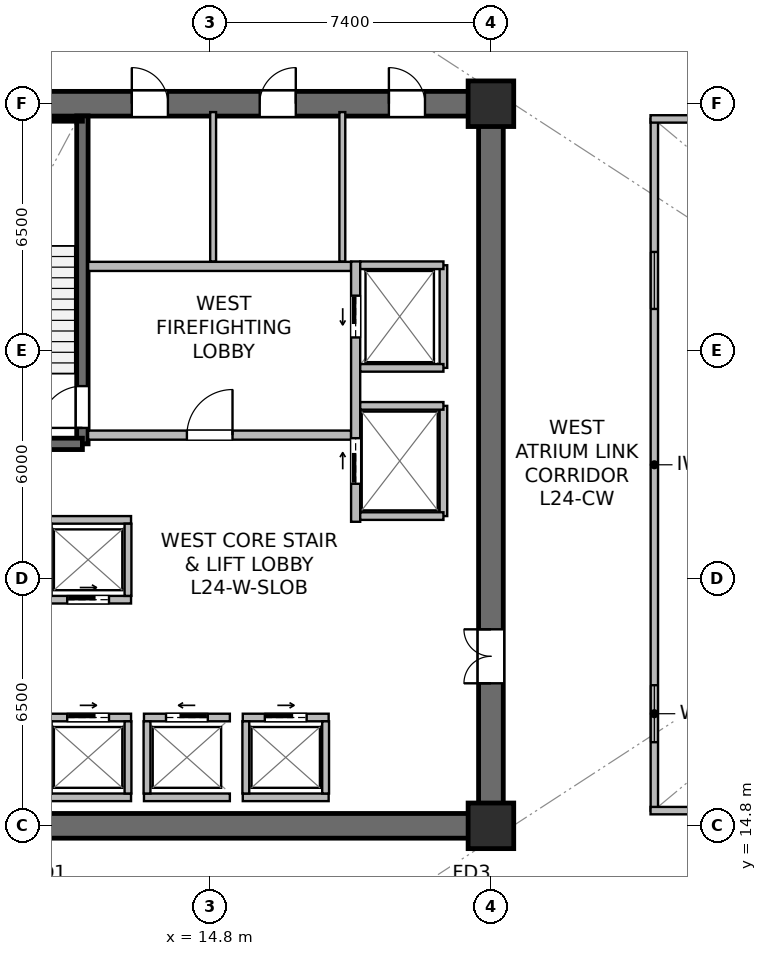
"""IFC4 building model, lengths in metres.
Left out: names, types, materials, properties, quantities, classifications, styles, units other than length and angle.
Written with IfcOpenShell. Run it as: python <this file> out.ifc"""

import sys

from ifc_helpers import new_model, si_unit, direction, frame, frame_2d, origin, origin_2d, place, context, subcontext, project, spatial, rectangle, extrude, source, transform, mapped, element, fill, save


model = new_model("IFC4")
c1 = context("Model", 3, precision=1e-05, world=origin(), true_north=direction((0.0, 1.0)))
c2 = subcontext(c1, "Body", "Model", "MODEL_VIEW")
j1 = project(units=[si_unit("LENGTHUNIT", "METRE"), si_unit("PLANEANGLEUNIT", "RADIAN")], contexts=[c1])
p1 = place(None, origin())
s1 = spatial("IfcSite", under=j1, at=p1, CompositionType="ELEMENT")
p2 = place(p1, origin())
s2 = spatial("IfcBuilding", under=s1, at=p2, CompositionType="ELEMENT")
p3 = place(p2, frame((0.0, 0.0, 100.3)))
s3 = spatial("IfcBuildingStorey", under=s2, at=p3, CompositionType="ELEMENT", Elevation=100.3)
p4 = place(p3, frame((7.075, 14.8, 0.0), z_axis=(0.0, 0.0, 1.0), x_axis=(1.0, 0.0, 0.0)))
e1 = element("IfcWall", 1, at=p4, inside=s3, PredefinedType="SHEAR", context=c2, shape_type="SweptSolid", body=[
    extrude(rectangle(XDim=15.45, YDim=0.65, at=frame_2d((7.725, 0.0))), origin(), (0.0, 0.0, 1.0), 4.49),
])
p5 = place(p3, frame((7.075, 33.8, 0.0), z_axis=(0.0, 0.0, 1.0), x_axis=(1.0, 0.0, 0.0)))
e2 = element("IfcWall", 2, at=p5, inside=s3, PredefinedType="SHEAR", context=c2, shape_type="SweptSolid", body=[
    extrude(rectangle(XDim=15.45, YDim=0.65, at=frame_2d((7.725, 0.0))), origin(), (0.0, 0.0, 1.0), 4.49),
])
p6 = place(p5, frame((5.675, 0.0, 0.0)))
e3 = element("IfcOpeningElement", 3, at=p6, cuts=e2, PredefinedType="OPENING", context=c2, shape_type="SweptSolid", body=[
    extrude(rectangle(XDim=0.95, YDim=2.15, at=frame_2d((0.475, 1.075))), frame((0.0, 0.335, 0.0), z_axis=(0.0, -1.0, 0.0), x_axis=(1.0, 0.0, 0.0)), (0.0, 0.0, 1.0), 0.67),
])
p7 = place(p5, frame((9.04, 0.0, 0.0)))
e4 = element("IfcOpeningElement", 4, at=p7, cuts=e2, PredefinedType="OPENING", context=c2, shape_type="SweptSolid", body=[
    extrude(rectangle(XDim=0.95, YDim=2.15, at=frame_2d((0.475, 1.075))), frame((0.0, 0.335, 0.0), z_axis=(0.0, -1.0, 0.0), x_axis=(1.0, 0.0, 0.0)), (0.0, 0.0, 1.0), 0.67),
])
p8 = place(p5, frame((12.44, 0.0, 0.0)))
e5 = element("IfcOpeningElement", 5, at=p8, cuts=e2, PredefinedType="OPENING", context=c2, shape_type="SweptSolid", body=[
    extrude(rectangle(XDim=0.95, YDim=2.15, at=frame_2d((0.475, 1.075))), frame((0.0, 0.335, 0.0), z_axis=(0.0, -1.0, 0.0), x_axis=(1.0, 0.0, 0.0)), (0.0, 0.0, 1.0), 0.67),
])
p9 = place(p3, frame((22.2, 15.125, 0.0), z_axis=(0.0, 0.0, 1.0), x_axis=(0.0, 1.0, 0.0)))
e6 = element("IfcWall", 6, at=p9, inside=s3, PredefinedType="SHEAR", context=c2, shape_type="SweptSolid", body=[
    extrude(rectangle(XDim=18.35, YDim=0.65, at=frame_2d((9.175, 0.0))), origin(), (0.0, 0.0, 1.0), 4.49),
])
p10 = place(p9, frame((3.425, 0.0, 0.0)))
e7 = element("IfcOpeningElement", 7, at=p10, cuts=e6, PredefinedType="OPENING", context=c2, shape_type="SweptSolid", body=[
    extrude(rectangle(XDim=1.42, YDim=2.2, at=frame_2d((0.71, 1.1))), frame((0.0, 0.335, 0.0), z_axis=(0.0, -1.0, 0.0), x_axis=(1.0, 0.0, 0.0)), (0.0, 0.0, 1.0), 0.67),
])
p11 = place(p3, frame((11.45, 24.85, 0.0), z_axis=(0.0, 0.0, 1.0), x_axis=(0.0, 1.0, 0.0)))
e8 = element("IfcWall", 8, at=p11, inside=s3, PredefinedType="SHEAR", context=c2, shape_type="SweptSolid", body=[
    extrude(rectangle(XDim=8.63, YDim=0.3, at=frame_2d((4.315, 0.0))), origin(), (0.0, 0.0, 1.0), 4.49),
])
p12 = place(p11, frame((0.42, 0.0, 0.0)))
e9 = element("IfcOpeningElement", 9, at=p12, cuts=e8, PredefinedType="OPENING", context=c2, shape_type="SweptSolid", body=[
    extrude(rectangle(XDim=1.1, YDim=2.15, at=frame_2d((0.55, 1.075))), frame((0.0, 0.16, 0.0), z_axis=(0.0, -1.0, 0.0), x_axis=(1.0, 0.0, 0.0)), (0.0, 0.0, 1.0), 0.32),
])
p13 = place(p3, frame((7.65, 24.85, 0.0), z_axis=(0.0, 0.0, 1.0), x_axis=(1.0, 0.0, 0.0)))
e10 = element("IfcWall", 10, at=p13, inside=s3, PredefinedType="SHEAR", context=c2, shape_type="SweptSolid", body=[
    extrude(rectangle(XDim=3.8, YDim=0.3, at=frame_2d((1.9, 0.0))), origin(), (0.0, 0.0, 1.0), 4.49),
])
p14 = place(p3, frame((7.73, 33.4, 0.0), z_axis=(0.0, 0.0, 1.0), x_axis=(1.0, 0.0, 0.0)))
e11 = element("IfcWall", 11, at=p14, inside=s3, PredefinedType="SOLIDWALL", context=c2, shape_type="SweptSolid", body=[
    extrude(rectangle(XDim=3.72, YDim=0.12, at=frame_2d((1.86, 0.0))), origin(), (0.0, 0.0, 1.0), 4.49),
])
m1 = source(origin(), c2, "Body", "SweptSolid", [
    extrude(rectangle(XDim=1.2, YDim=1.2, at=origin_2d()), origin(), (0.0, 0.0, 1.0), 4.8),
])
for number, where, z_axis, x_axis in (
    (12, (22.2, 14.8, 0.0), (0.0, 0.0, 1.0), (1.0, 0.0, 0.0)),
    (13, (22.2, 33.8, 0.0), (0.0, 0.0, 1.0), (1.0, 0.0, 0.0)),
):
    element("IfcColumn", number, at=place(p3, frame(where, z_axis=z_axis, x_axis=x_axis)), inside=s3, PredefinedType="COLUMN", context=c2, shape_type="MappedRepresentation", body=[
        mapped(m1, transform((0.0, 0.0, 0.0), scale=1.0)),
    ])
p15 = place(p3, frame((11.6, 25.08, 0.0), z_axis=(0.0, 0.0, 1.0), x_axis=(1.0, 0.0, 0.0)))
e14 = element("IfcWall", 14, at=p15, inside=s3, PredefinedType="SOLIDWALL", context=c2, shape_type="SweptSolid", body=[
    extrude(rectangle(XDim=6.92, YDim=0.24, at=frame_2d((3.46, 0.0))), origin(), (0.0, 0.0, 1.0), 3.825),
])
p16 = place(p15, frame((2.6, 0.0, 0.0)))
e15 = element("IfcOpeningElement", 15, at=p16, cuts=e14, PredefinedType="OPENING", context=c2, shape_type="SweptSolid", body=[
    extrude(rectangle(XDim=1.2, YDim=2.16, at=frame_2d((0.6, 1.08))), frame((0.0, 0.13, 0.0), z_axis=(0.0, -1.0, 0.0), x_axis=(1.0, 0.0, 0.0)), (0.0, 0.0, 1.0), 0.26),
])
p17 = place(p3, frame((11.6, 29.52, 0.0), z_axis=(0.0, 0.0, 1.0), x_axis=(1.0, 0.0, 0.0)))
e16 = element("IfcWall", 16, at=p17, inside=s3, PredefinedType="SOLIDWALL", context=c2, shape_type="SweptSolid", body=[
    extrude(rectangle(XDim=6.92, YDim=0.24, at=frame_2d((3.46, 0.0))), origin(), (0.0, 0.0, 1.0), 3.825),
])
p18 = place(p3, frame((18.64, 22.8, 0.0), z_axis=(0.0, 0.0, 1.0), x_axis=(0.0, 1.0, 0.0)))
e17 = element("IfcWall", 17, at=p18, inside=s3, PredefinedType="SOLIDWALL", context=c2, shape_type="SweptSolid", body=[
    extrude(rectangle(XDim=6.85, YDim=0.24, at=frame_2d((3.425, 0.0))), origin(), (0.0, 0.0, 1.0), 3.575),
])
p19 = place(p18, frame((4.85, 0.0, 0.0)))
e18 = element("IfcOpeningElement", 18, at=p19, cuts=e17, PredefinedType="OPENING", context=c2, shape_type="SweptSolid", body=[
    extrude(rectangle(XDim=1.1, YDim=2.22, at=frame_2d((0.55, 1.11))), frame((0.0, 0.13, 0.0), z_axis=(0.0, -1.0, 0.0), x_axis=(1.0, 0.0, 0.0)), (0.0, 0.0, 1.0), 0.26),
])
p20 = place(p18, frame((1.0, 0.0, 0.0)))
e19 = element("IfcOpeningElement", 19, at=p20, cuts=e17, PredefinedType="OPENING", context=c2, shape_type="SweptSolid", body=[
    extrude(rectangle(XDim=1.2, YDim=2.22, at=frame_2d((0.6, 1.11))), frame((0.0, 0.13, 0.0), z_axis=(0.0, -1.0, 0.0), x_axis=(1.0, 0.0, 0.0)), (0.0, 0.0, 1.0), 0.26),
])
p21 = place(p3, frame((10.47, 17.65, 0.0), z_axis=(0.0, 0.0, 1.0), x_axis=(1.0, 0.0, 0.0)))
e20 = element("IfcWall", 20, at=p21, inside=s3, PredefinedType="SOLIDWALL", context=c2, shape_type="SweptSolid", body=[
    extrude(rectangle(XDim=2.26, YDim=0.2, at=frame_2d((1.13, 0.0))), origin(), (0.0, 0.0, 1.0), 4.49),
])
p22 = place(p21, frame((0.58, 0.0, 0.0)))
e21 = element("IfcOpeningElement", 21, at=p22, cuts=e20, PredefinedType="OPENING", context=c2, shape_type="SweptSolid", body=[
    extrude(rectangle(XDim=1.1, YDim=2.22, at=frame_2d((0.55, 1.11))), frame((0.0, 0.11, 0.0), z_axis=(0.0, -1.0, 0.0), x_axis=(1.0, 0.0, 0.0)), (0.0, 0.0, 1.0), 0.22),
])
p23 = place(p3, frame((10.47, 15.55, 0.0), z_axis=(0.0, 0.0, 1.0), x_axis=(1.0, 0.0, 0.0)))
e22 = element("IfcWall", 22, at=p23, inside=s3, PredefinedType="SOLIDWALL", context=c2, shape_type="SweptSolid", body=[
    extrude(rectangle(XDim=2.26, YDim=0.2, at=frame_2d((1.13, 0.0))), origin(), (0.0, 0.0, 1.0), 4.49),
])
p24 = place(p3, frame((12.65, 15.65, 0.0), z_axis=(0.0, 0.0, 1.0), x_axis=(0.0, 1.0, 0.0)))
e23 = element("IfcWall", 23, at=p24, inside=s3, PredefinedType="SOLIDWALL", context=c2, shape_type="SweptSolid", body=[
    extrude(rectangle(XDim=1.9, YDim=0.18, at=frame_2d((0.95, 0.0))), origin(), (0.0, 0.0, 1.0), 4.49),
])
p25 = place(p3, frame((13.07, 17.65, 0.0), z_axis=(0.0, 0.0, 1.0), x_axis=(1.0, 0.0, 0.0)))
e24 = element("IfcWall", 24, at=p25, inside=s3, PredefinedType="SOLIDWALL", context=c2, shape_type="SweptSolid", body=[
    extrude(rectangle(XDim=2.26, YDim=0.2, at=frame_2d((1.13, 0.0))), origin(), (0.0, 0.0, 1.0), 3.825),
])
p26 = place(p25, frame((0.58, 0.0, 0.0)))
e25 = element("IfcOpeningElement", 25, at=p26, cuts=e24, PredefinedType="OPENING", context=c2, shape_type="SweptSolid", body=[
    extrude(rectangle(XDim=1.1, YDim=2.22, at=frame_2d((0.55, 1.11))), frame((0.0, 0.11, 0.0), z_axis=(0.0, -1.0, 0.0), x_axis=(1.0, 0.0, 0.0)), (0.0, 0.0, 1.0), 0.22),
])
p27 = place(p3, frame((13.07, 15.55, 0.0), z_axis=(0.0, 0.0, 1.0), x_axis=(1.0, 0.0, 0.0)))
e26 = element("IfcWall", 26, at=p27, inside=s3, PredefinedType="SOLIDWALL", context=c2, shape_type="SweptSolid", body=[
    extrude(rectangle(XDim=2.26, YDim=0.2, at=frame_2d((1.13, 0.0))), origin(), (0.0, 0.0, 1.0), 3.825),
])
p28 = place(p3, frame((13.15, 15.65, 0.0), z_axis=(0.0, 0.0, 1.0), x_axis=(0.0, 1.0, 0.0)))
e27 = element("IfcWall", 27, at=p28, inside=s3, PredefinedType="SOLIDWALL", context=c2, shape_type="SweptSolid", body=[
    extrude(rectangle(XDim=1.9, YDim=0.18, at=frame_2d((0.95, 0.0))), origin(), (0.0, 0.0, 1.0), 4.49),
])
p29 = place(p3, frame((15.67, 17.65, 0.0), z_axis=(0.0, 0.0, 1.0), x_axis=(1.0, 0.0, 0.0)))
e28 = element("IfcWall", 28, at=p29, inside=s3, PredefinedType="SOLIDWALL", context=c2, shape_type="SweptSolid", body=[
    extrude(rectangle(XDim=2.26, YDim=0.2, at=frame_2d((1.13, 0.0))), origin(), (0.0, 0.0, 1.0), 4.49),
])
p30 = place(p29, frame((0.58, 0.0, 0.0)))
e29 = element("IfcOpeningElement", 29, at=p30, cuts=e28, PredefinedType="OPENING", context=c2, shape_type="SweptSolid", body=[
    extrude(rectangle(XDim=1.1, YDim=2.22, at=frame_2d((0.55, 1.11))), frame((0.0, 0.11, 0.0), z_axis=(0.0, -1.0, 0.0), x_axis=(1.0, 0.0, 0.0)), (0.0, 0.0, 1.0), 0.22),
])
p31 = place(p3, frame((15.67, 15.55, 0.0), z_axis=(0.0, 0.0, 1.0), x_axis=(1.0, 0.0, 0.0)))
e30 = element("IfcWall", 30, at=p31, inside=s3, PredefinedType="SOLIDWALL", context=c2, shape_type="SweptSolid", body=[
    extrude(rectangle(XDim=2.26, YDim=0.2, at=frame_2d((1.13, 0.0))), origin(), (0.0, 0.0, 1.0), 4.49),
])
for number, where, z_axis, x_axis in (
    (31, (15.75, 15.65, 0.0), (0.0, 0.0, 1.0), (0.0, 1.0, 0.0)),
    (32, (17.85, 15.65, 0.0), (0.0, 0.0, 1.0), (0.0, 1.0, 0.0)),
):
    element("IfcWall", number, at=place(p3, frame(where, z_axis=z_axis, x_axis=x_axis)), inside=s3, PredefinedType="SOLIDWALL", context=c2, shape_type="SweptSolid", body=[
        extrude(rectangle(XDim=1.9, YDim=0.18, at=frame_2d((0.95, 0.0))), origin(), (0.0, 0.0, 1.0), 4.49),
    ])
p32 = place(p3, frame((10.47, 20.75, 0.0), z_axis=(0.0, 0.0, 1.0), x_axis=(1.0, 0.0, 0.0)))
e33 = element("IfcWall", 33, at=p32, inside=s3, PredefinedType="SOLIDWALL", context=c2, shape_type="SweptSolid", body=[
    extrude(rectangle(XDim=2.26, YDim=0.2, at=frame_2d((1.13, 0.0))), origin(), (0.0, 0.0, 1.0), 4.49),
])
p33 = place(p32, frame((0.58, 0.0, 0.0)))
e34 = element("IfcOpeningElement", 34, at=p33, cuts=e33, PredefinedType="OPENING", context=c2, shape_type="SweptSolid", body=[
    extrude(rectangle(XDim=1.1, YDim=2.22, at=frame_2d((0.55, 1.11))), frame((0.0, 0.11, 0.0), z_axis=(0.0, -1.0, 0.0), x_axis=(1.0, 0.0, 0.0)), (0.0, 0.0, 1.0), 0.22),
])
p34 = place(p3, frame((10.47, 22.85, 0.0), z_axis=(0.0, 0.0, 1.0), x_axis=(1.0, 0.0, 0.0)))
e35 = element("IfcWall", 35, at=p34, inside=s3, PredefinedType="SOLIDWALL", context=c2, shape_type="SweptSolid", body=[
    extrude(rectangle(XDim=2.26, YDim=0.2, at=frame_2d((1.13, 0.0))), origin(), (0.0, 0.0, 1.0), 4.49),
])
p35 = place(p3, frame((12.65, 20.85, 0.0), z_axis=(0.0, 0.0, 1.0), x_axis=(0.0, 1.0, 0.0)))
e36 = element("IfcWall", 36, at=p35, inside=s3, PredefinedType="SOLIDWALL", context=c2, shape_type="SweptSolid", body=[
    extrude(rectangle(XDim=1.9, YDim=0.18, at=frame_2d((0.95, 0.0))), origin(), (0.0, 0.0, 1.0), 4.49),
])
p36 = place(p3, frame((20.95, 26.85, 0.0), z_axis=(0.0, 0.0, 1.0), x_axis=(0.0, 1.0, 0.0)))
e37 = element("IfcWall", 37, at=p36, inside=s3, PredefinedType="SOLIDWALL", context=c2, shape_type="SweptSolid", body=[
    extrude(rectangle(XDim=2.7, YDim=0.2, at=frame_2d((1.35, 0.0))), origin(), (0.0, 0.0, 1.0), 4.49),
])
p37 = place(p3, frame((18.76, 29.55, 0.0), z_axis=(0.0, 0.0, 1.0), x_axis=(1.0, 0.0, 0.0)))
e38 = element("IfcWall", 38, at=p37, inside=s3, PredefinedType="SOLIDWALL", context=c2, shape_type="SweptSolid", body=[
    extrude(rectangle(XDim=2.19, YDim=0.2, at=frame_2d((1.095, 0.0))), origin(), (0.0, 0.0, 1.0), 4.49),
])
p38 = place(p3, frame((18.76, 26.85, 0.0), z_axis=(0.0, 0.0, 1.0), x_axis=(1.0, 0.0, 0.0)))
e39 = element("IfcWall", 39, at=p38, inside=s3, PredefinedType="SOLIDWALL", context=c2, shape_type="SweptSolid", body=[
    extrude(rectangle(XDim=2.19, YDim=0.2, at=frame_2d((1.095, 0.0))), origin(), (0.0, 0.0, 1.0), 3.887),
])
p39 = place(p3, frame((20.95, 22.95, 0.0), z_axis=(0.0, 0.0, 1.0), x_axis=(0.0, 1.0, 0.0)))
e40 = element("IfcWall", 40, at=p39, inside=s3, PredefinedType="SOLIDWALL", context=c2, shape_type="SweptSolid", body=[
    extrude(rectangle(XDim=2.9, YDim=0.2, at=frame_2d((1.45, 0.0))), origin(), (0.0, 0.0, 1.0), 3.575),
])
for number, where, z_axis, x_axis in (
    (41, (18.76, 25.85, 0.0), (0.0, 0.0, 1.0), (1.0, 0.0, 0.0)),
    (42, (18.76, 22.95, 0.0), (0.0, 0.0, 1.0), (1.0, 0.0, 0.0)),
):
    element("IfcWall", number, at=place(p3, frame(where, z_axis=z_axis, x_axis=x_axis)), inside=s3, PredefinedType="SOLIDWALL", context=c2, shape_type="SweptSolid", body=[
        extrude(rectangle(XDim=2.19, YDim=0.2, at=frame_2d((1.095, 0.0))), origin(), (0.0, 0.0, 1.0), 4.49),
    ])
p40 = place(p3, frame((14.89, 29.65, 0.0), z_axis=(0.0, 0.0, 1.0), x_axis=(0.0, 1.0, 0.0)))
e43 = element("IfcWall", 43, at=p40, inside=s3, PredefinedType="PLUMBINGWALL", context=c2, shape_type="SweptSolid", body=[
    extrude(rectangle(XDim=3.93, YDim=0.155, at=frame_2d((1.965, 0.0))), origin(), (0.0, 0.0, 1.0), 3.825),
])
p41 = place(p3, frame((18.29, 29.65, 0.0), z_axis=(0.0, 0.0, 1.0), x_axis=(0.0, 1.0, 0.0)))
e44 = element("IfcWall", 44, at=p41, inside=s3, PredefinedType="PLUMBINGWALL", context=c2, shape_type="SweptSolid", body=[
    extrude(rectangle(XDim=3.93, YDim=0.155, at=frame_2d((1.965, 0.0))), origin(), (0.0, 0.0, 1.0), 4.49),
])
p42 = place(p3, frame((26.5, 15.2, 0.0), z_axis=(0.0, 0.0, 1.0), x_axis=(0.0, 1.0, 0.0)))
e45 = element("IfcWall", 45, at=p42, inside=s3, PredefinedType="SOLIDWALL", context=c2, shape_type="SweptSolid", body=[
    extrude(rectangle(XDim=18.2, YDim=0.195, at=frame_2d((9.1, 0.0))), origin(), (0.0, 0.0, 1.0), 4.49),
])
p43 = place(p42, frame((1.8, 0.0, 0.9)))
e46 = element("IfcOpeningElement", 46, at=p43, cuts=e45, PredefinedType="OPENING", context=c2, shape_type="SweptSolid", body=[
    extrude(rectangle(XDim=1.5, YDim=1.4, at=frame_2d((0.75, 0.7))), frame((0.0, 0.107, 0.0), z_axis=(0.0, -1.0, 0.0), x_axis=(1.0, 0.0, 0.0)), (0.0, 0.0, 1.0), 0.215),
])
p44 = place(p42, frame((13.2, 0.0, 0.9)))
e47 = element("IfcOpeningElement", 47, at=p44, cuts=e45, PredefinedType="OPENING", context=c2, shape_type="SweptSolid", body=[
    extrude(rectangle(XDim=1.5, YDim=1.4, at=frame_2d((0.75, 0.7))), frame((0.0, 0.107, 0.0), z_axis=(0.0, -1.0, 0.0), x_axis=(1.0, 0.0, 0.0)), (0.0, 0.0, 1.0), 0.215),
])
for number, where, z_axis, x_axis in (
    (48, (26.4, 15.2, 0.0), (0.0, 0.0, 1.0), (1.0, 0.0, 0.0)),
    (49, (26.4, 33.4, 0.0), (0.0, 0.0, 1.0), (1.0, 0.0, 0.0)),
):
    element("IfcWall", number, at=place(p3, frame(where, z_axis=z_axis, x_axis=x_axis)), inside=s3, PredefinedType="SOLIDWALL", context=c2, shape_type="SweptSolid", body=[
        extrude(rectangle(XDim=22.0, YDim=0.195, at=frame_2d((11.0, 0.0))), origin(), (0.0, 0.0, 1.0), 4.49),
    ])
m2 = source(origin(), c2, "Body", "SweptSolid", [
    extrude(rectangle(XDim=1.5, YDim=1.4, at=frame_2d((0.75, 0.7))), frame((0.0, 0.03, 0.0), z_axis=(0.0, -1.0, 0.0), x_axis=(1.0, 0.0, 0.0)), (0.0, 0.0, 1.0), 0.06),
])
p45 = place(p43, origin())
e50 = element("IfcWindow", 50, at=p45, inside=s3, PartitioningType="SINGLE_PANEL", PredefinedType="WINDOW", context=c2, shape_type="MappedRepresentation", body=[
    mapped(m2, transform((0.0, 0.0, 0.0), scale=1.0)),
])
fill(e46, e50)
p46 = place(p44, origin())
e51 = element("IfcWindow", 51, at=p46, inside=s3, PartitioningType="SINGLE_PANEL", PredefinedType="WINDOW", context=c2, shape_type="MappedRepresentation", body=[
    mapped(m2, transform((0.0, 0.0, 0.0), scale=1.0)),
])
fill(e47, e51)
m3 = source(origin(), c2, "Body", "SweptSolid", [
    extrude(rectangle(XDim=1.1, YDim=2.15, at=frame_2d((0.55, 1.075))), frame((0.0, 0.025, 0.0), z_axis=(0.0, -1.0, 0.0), x_axis=(1.0, 0.0, 0.0)), (0.0, 0.0, 1.0), 0.05),
])
p47 = place(p12, origin())
e52 = element("IfcDoor", 52, at=p47, inside=s3, OperationType="SINGLE_SWING_LEFT", PredefinedType="DOOR", context=c2, shape_type="MappedRepresentation", body=[
    mapped(m3, transform((0.0, 0.0, 0.0), scale=1.0)),
])
fill(e9, e52)
m4 = source(origin(), c2, "Body", "SweptSolid", [
    extrude(rectangle(XDim=1.2, YDim=2.16, at=frame_2d((0.6, 1.08))), frame((0.0, 0.025, 0.0), z_axis=(0.0, -1.0, 0.0), x_axis=(1.0, 0.0, 0.0)), (0.0, 0.0, 1.0), 0.05),
])
p48 = place(p16, origin())
e53 = element("IfcDoor", 53, at=p48, inside=s3, OperationType="SINGLE_SWING_RIGHT", PredefinedType="DOOR", context=c2, shape_type="MappedRepresentation", body=[
    mapped(m4, transform((0.0, 0.0, 0.0), scale=1.0)),
])
fill(e15, e53)
m5 = source(origin(), c2, "Body", "SweptSolid", [
    extrude(rectangle(XDim=1.1, YDim=2.22, at=frame_2d((0.55, 1.11))), frame((0.0, 0.025, 0.0), z_axis=(0.0, -1.0, 0.0), x_axis=(1.0, 0.0, 0.0)), (0.0, 0.0, 1.0), 0.05),
])
p49 = place(p22, origin())
e54 = element("IfcDoor", 54, at=p49, inside=s3, OperationType="SLIDING_TO_RIGHT", PredefinedType="USERDEFINED", context=c2, shape_type="MappedRepresentation", body=[
    mapped(m5, transform((0.0, 0.0, 0.0), scale=1.0)),
])
fill(e21, e54)
p50 = place(p26, origin())
e55 = element("IfcDoor", 55, at=p50, inside=s3, OperationType="SLIDING_TO_LEFT", PredefinedType="USERDEFINED", context=c2, shape_type="MappedRepresentation", body=[
    mapped(m5, transform((0.0, 0.0, 0.0), scale=1.0)),
])
fill(e25, e55)
p51 = place(p30, origin())
e56 = element("IfcDoor", 56, at=p51, inside=s3, OperationType="SLIDING_TO_RIGHT", PredefinedType="USERDEFINED", context=c2, shape_type="MappedRepresentation", body=[
    mapped(m5, transform((0.0, 0.0, 0.0), scale=1.0)),
])
fill(e29, e56)
p52 = place(p33, origin())
e57 = element("IfcDoor", 57, at=p52, inside=s3, OperationType="SLIDING_TO_RIGHT", PredefinedType="USERDEFINED", context=c2, shape_type="MappedRepresentation", body=[
    mapped(m5, transform((0.0, 0.0, 0.0), scale=1.0)),
])
fill(e34, e57)
p53 = place(p19, origin())
e58 = element("IfcDoor", 58, at=p53, inside=s3, OperationType="SLIDING_TO_LEFT", PredefinedType="USERDEFINED", context=c2, shape_type="MappedRepresentation", body=[
    mapped(m5, transform((0.0, 0.0, 0.0), scale=1.0)),
])
fill(e18, e58)
m6 = source(origin(), c2, "Body", "SweptSolid", [
    extrude(rectangle(XDim=1.2, YDim=2.22, at=frame_2d((0.6, 1.11))), frame((0.0, 0.025, 0.0), z_axis=(0.0, -1.0, 0.0), x_axis=(1.0, 0.0, 0.0)), (0.0, 0.0, 1.0), 0.05),
])
p54 = place(p20, origin())
e59 = element("IfcDoor", 59, at=p54, inside=s3, OperationType="SLIDING_TO_RIGHT", PredefinedType="USERDEFINED", context=c2, shape_type="MappedRepresentation", body=[
    mapped(m6, transform((0.0, 0.0, 0.0), scale=1.0)),
])
fill(e19, e59)
m7 = source(origin(), c2, "Body", "SweptSolid", [
    extrude(rectangle(XDim=1.42, YDim=2.2, at=frame_2d((0.71, 1.1))), frame((0.0, 0.025, 0.0), z_axis=(0.0, -1.0, 0.0), x_axis=(1.0, 0.0, 0.0)), (0.0, 0.0, 1.0), 0.05),
])
p55 = place(p10, origin())
e60 = element("IfcDoor", 60, at=p55, inside=s3, OperationType="DOUBLE_DOOR_SINGLE_SWING", PredefinedType="DOOR", context=c2, shape_type="MappedRepresentation", body=[
    mapped(m7, transform((0.0, 0.0, 0.0), scale=1.0)),
])
fill(e7, e60)
m8 = source(origin(), c2, "Body", "SweptSolid", [
    extrude(rectangle(XDim=0.95, YDim=2.15, at=frame_2d((0.475, 1.075))), frame((0.0, 0.025, 0.0), z_axis=(0.0, -1.0, 0.0), x_axis=(1.0, 0.0, 0.0)), (0.0, 0.0, 1.0), 0.05),
])
p56 = place(p6, origin())
e61 = element("IfcDoor", 61, at=p56, inside=s3, OperationType="SINGLE_SWING_LEFT", PredefinedType="DOOR", context=c2, shape_type="MappedRepresentation", body=[
    mapped(m8, transform((0.0, 0.0, 0.0), scale=1.0)),
])
fill(e3, e61)
p57 = place(p7, origin())
e62 = element("IfcDoor", 62, at=p57, inside=s3, OperationType="SINGLE_SWING_RIGHT", PredefinedType="DOOR", context=c2, shape_type="MappedRepresentation", body=[
    mapped(m8, transform((0.0, 0.0, 0.0), scale=1.0)),
])
fill(e4, e62)
p58 = place(p8, origin())
e63 = element("IfcDoor", 63, at=p58, inside=s3, OperationType="SINGLE_SWING_LEFT", PredefinedType="DOOR", context=c2, shape_type="MappedRepresentation", body=[
    mapped(m8, transform((0.0, 0.0, 0.0), scale=1.0)),
])
fill(e5, e63)
save(model, sys.argv[1])
